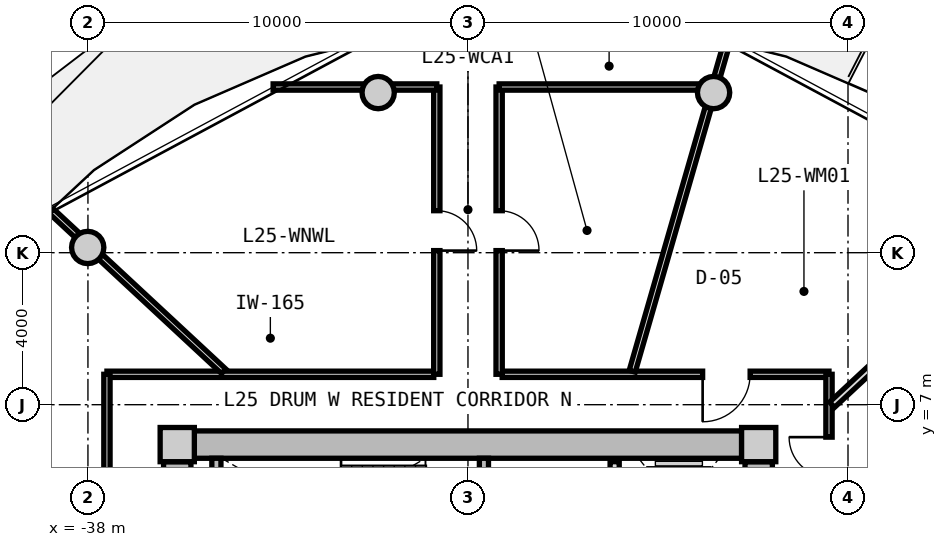
"""IFC4 building model, lengths in metres.
Left out: names, types, materials, properties, quantities, classifications, styles, units other than length and angle.
Written with IfcOpenShell. Run it as: python <this file> out.ifc"""

import sys

from ifc_helpers import new_model, si_unit, direction, frame, frame_2d, origin, origin_2d, place, context, subcontext, project, spatial, rectangle, circle, extrude, source, transform, mapped, element, fill, save


model = new_model("IFC4")
c1 = context("Model", 3, precision=1e-05, world=origin(), true_north=direction((0.0, 1.0)))
c2 = subcontext(c1, "Body", "Model", "MODEL_VIEW")
j1 = project(units=[si_unit("LENGTHUNIT", "METRE"), si_unit("PLANEANGLEUNIT", "RADIAN")], contexts=[c1])
p1 = place(None, origin())
s1 = spatial("IfcSite", under=j1, at=p1, CompositionType="ELEMENT")
p2 = place(p1, origin())
s2 = spatial("IfcBuilding", under=s1, at=p2, CompositionType="ELEMENT")
p3 = place(p2, frame((0.0, 0.0, 84.05)))
s3 = spatial("IfcBuildingStorey", under=s2, at=p3, CompositionType="ELEMENT", Elevation=84.05)
m1 = source(origin(), c2, "Body", "SweptSolid", [
    extrude(rectangle(XDim=0.9, YDim=0.9, at=origin_2d()), origin(), (0.0, 0.0, 1.0), 3.05),
])
for number, where, z_axis, x_axis in (
    (1, (-20.35, 5.95, 0.0), (0.0, 0.0, 1.0), (1.0, 0.0, 0.0)),
    (2, (-35.65, 5.95, 0.0), (0.0, 0.0, 1.0), (1.0, 0.0, 0.0)),
):
    element("IfcColumn", number, at=place(p3, frame(where, z_axis=z_axis, x_axis=x_axis)), inside=s3, PredefinedType="COLUMN", context=c2, shape_type="MappedRepresentation", body=[
        mapped(m1, transform((0.0, 0.0, 0.0), x_axis=(1.0, 0.0, 0.0), y_axis=(0.0, 1.0, 0.0), z_axis=(0.0, 0.0, 1.0), scale=1.0)),
    ])
m2 = source(origin(), c2, "Body", "SweptSolid", [
    extrude(rectangle(XDim=14.4, YDim=0.72, at=frame_2d((7.2, 0.0))), origin(), (0.0, 0.0, 1.0), 2.79),
])
p4 = place(p3, frame((-35.2, 5.95, 0.0), z_axis=(0.0, 0.0, 1.0), x_axis=(1.0, 0.0, 0.0)))
e3 = element("IfcWall", 3, at=p4, inside=s3, PredefinedType="SHEAR", context=c2, shape_type="MappedRepresentation", body=[
    mapped(m2, transform((0.0, 0.0, 0.0), x_axis=(1.0, 0.0, 0.0), y_axis=(0.0, 1.0, 0.0), z_axis=(0.0, 0.0, 1.0), scale=1.0)),
])
m3 = source(origin(), c2, "Body", "SweptSolid", [
    extrude(rectangle(XDim=11.0, YDim=0.72, at=frame_2d((5.5, 0.0))), origin(), (0.0, 0.0, 1.0), 2.79),
])
p5 = place(p3, frame((-35.65, -5.5, 0.0), z_axis=(0.0, 0.0, 1.0), x_axis=(0.0, 1.0, 0.0)))
e4 = element("IfcWall", 4, at=p5, inside=s3, PredefinedType="SHEAR", context=c2, shape_type="MappedRepresentation", body=[
    mapped(m3, transform((0.0, 0.0, 0.0), x_axis=(1.0, 0.0, 0.0), y_axis=(0.0, 1.0, 0.0), z_axis=(0.0, 0.0, 1.0), scale=1.0)),
])
p6 = place(p5, frame((3.8, 0.0, 0.0)))
e5 = element("IfcOpeningElement", 5, at=p6, cuts=e4, PredefinedType="OPENING", context=c2, shape_type="SweptSolid", body=[
    extrude(rectangle(XDim=1.2, YDim=2.15, at=frame_2d((0.6, 1.075))), frame((0.0, 0.37, 0.0), z_axis=(0.0, -1.0, 0.0), x_axis=(1.0, 0.0, 0.0)), (0.0, 0.0, 1.0), 0.74),
])
p7 = place(p3, frame((-20.35, 5.5, 0.0), z_axis=(0.0, 0.0, 1.0), x_axis=(0.0, -1.0, 0.0)))
e6 = element("IfcWall", 6, at=p7, inside=s3, PredefinedType="SHEAR", context=c2, shape_type="MappedRepresentation", body=[
    mapped(m3, transform((0.0, 0.0, 0.0), x_axis=(1.0, 0.0, 0.0), y_axis=(0.0, 1.0, 0.0), z_axis=(0.0, 0.0, 1.0), scale=1.0)),
])
p8 = place(p7, frame((5.65, 0.0, 0.0)))
e7 = element("IfcOpeningElement", 7, at=p8, cuts=e6, PredefinedType="OPENING", context=c2, shape_type="SweptSolid", body=[
    extrude(rectangle(XDim=1.2, YDim=2.15, at=frame_2d((0.6, 1.075))), frame((0.0, 0.37, 0.0), z_axis=(0.0, -1.0, 0.0), x_axis=(1.0, 0.0, 0.0)), (0.0, 0.0, 1.0), 0.74),
])
m4 = source(origin(), c2, "Body", "SweptSolid", [
    extrude(circle(Radius=0.425, at=origin_2d()), origin(), (0.0, 0.0, 1.0), 3.05),
])
for number, where, z_axis, x_axis in (
    (8, (-21.537, 15.213, 0.0), (0.0, 0.0, 1.0), (1.0, 0.0, 0.0)),
    (9, (-30.363, 15.213, 0.0), (0.0, 0.0, 1.0), (1.0, 0.0, 0.0)),
    (10, (-38.006, 11.137, 0.0), (0.0, 0.0, 1.0), (1.0, 0.0, 0.0)),
):
    element("IfcColumn", number, at=place(p3, frame(where, z_axis=z_axis, x_axis=x_axis)), inside=s3, PredefinedType="COLUMN", context=c2, shape_type="MappedRepresentation", body=[
        mapped(m4, transform((0.0, 0.0, 0.0), x_axis=(1.0, 0.0, 0.0), y_axis=(0.0, 1.0, 0.0), z_axis=(0.0, 0.0, 1.0), scale=1.0)),
    ])
m5 = source(origin(), c2, "Body", "SweptSolid", [
    extrude(rectangle(XDim=3.14, YDim=0.24, at=frame_2d((1.57, 0.0))), origin(), (0.0, 0.0, 1.0), 2.79),
])
p9 = place(p3, frame((-34.62, 2.45, 0.0), z_axis=(0.0, 0.0, 1.0), x_axis=(0.0, 1.0, 0.0)))
e11 = element("IfcWall", 11, at=p9, inside=s3, PredefinedType="PARTITIONING", context=c2, shape_type="MappedRepresentation", body=[
    mapped(m5, transform((0.0, 0.0, 0.0), x_axis=(1.0, 0.0, 0.0), y_axis=(0.0, 1.0, 0.0), z_axis=(0.0, 0.0, 1.0), scale=1.0)),
])
p10 = place(p3, frame((-27.58, 2.45, 0.0), z_axis=(0.0, 0.0, 1.0), x_axis=(0.0, 1.0, 0.0)))
e12 = element("IfcWall", 12, at=p10, inside=s3, PredefinedType="PARTITIONING", context=c2, shape_type="MappedRepresentation", body=[
    mapped(m5, transform((0.0, 0.0, 0.0), x_axis=(1.0, 0.0, 0.0), y_axis=(0.0, 1.0, 0.0), z_axis=(0.0, 0.0, 1.0), scale=1.0)),
])
p11 = place(p10, frame((0.55, 0.0, 0.0)))
e13 = element("IfcOpeningElement", 13, at=p11, cuts=e12, PredefinedType="OPENING", context=c2, shape_type="SweptSolid", body=[
    extrude(rectangle(XDim=1.1, YDim=2.15, at=frame_2d((0.55, 1.075))), frame((0.0, 0.13, 0.0), z_axis=(0.0, -1.0, 0.0), x_axis=(1.0, 0.0, 0.0)), (0.0, 0.0, 1.0), 0.26),
])
m6 = source(origin(), c2, "Body", "SweptSolid", [
    extrude(rectangle(XDim=5.0, YDim=0.24, at=frame_2d((2.5, 0.0))), origin(), (0.0, 0.0, 1.0), 2.775),
])
p12 = place(p3, frame((-24.14, 0.5, 0.0), z_axis=(0.0, 0.0, 1.0), x_axis=(0.0, 1.0, 0.0)))
e14 = element("IfcWall", 14, at=p12, inside=s3, PredefinedType="PARTITIONING", context=c2, shape_type="MappedRepresentation", body=[
    mapped(m6, transform((0.0, 0.0, 0.0), x_axis=(1.0, 0.0, 0.0), y_axis=(0.0, 1.0, 0.0), z_axis=(0.0, 0.0, 1.0), scale=1.0)),
])
p13 = place(p12, frame((3.05, 0.0, 0.0)))
e15 = element("IfcOpeningElement", 15, at=p13, cuts=e14, PredefinedType="OPENING", context=c2, shape_type="SweptSolid", body=[
    extrude(rectangle(XDim=1.3, YDim=2.2, at=frame_2d((0.65, 1.1))), frame((0.0, 0.13, 0.0), z_axis=(0.0, -1.0, 0.0), x_axis=(1.0, 0.0, 0.0)), (0.0, 0.0, 1.0), 0.26),
])
p14 = place(p12, frame((0.55, 0.0, 0.0)))
e16 = element("IfcOpeningElement", 16, at=p14, cuts=e14, PredefinedType="OPENING", context=c2, shape_type="SweptSolid", body=[
    extrude(rectangle(XDim=1.3, YDim=2.2, at=frame_2d((0.65, 1.1))), frame((0.0, 0.13, 0.0), z_axis=(0.0, -1.0, 0.0), x_axis=(1.0, 0.0, 0.0)), (0.0, 0.0, 1.0), 0.26),
])
m7 = source(origin(), c2, "Body", "SweptSolid", [
    extrude(rectangle(XDim=8.6, YDim=0.165, at=frame_2d((4.3, 0.0))), origin(), (0.0, 0.0, 1.0), 2.775),
])
p15 = place(p3, frame((-37.5, 7.8, 0.0), z_axis=(0.0, 0.0, 1.0), x_axis=(1.0, 0.0, 0.0)))
e17 = element("IfcWall", 17, at=p15, inside=s3, PredefinedType="PARTITIONING", context=c2, shape_type="MappedRepresentation", body=[
    mapped(m7, transform((0.0, 0.0, 0.0), x_axis=(1.0, 0.0, 0.0), y_axis=(0.0, 1.0, 0.0), z_axis=(0.0, 0.0, 1.0), scale=1.0)),
])
p16 = place(p3, frame((-27.1, 7.8, 0.0), z_axis=(0.0, 0.0, 1.0), x_axis=(1.0, 0.0, 0.0)))
e18 = element("IfcWall", 18, at=p16, inside=s3, PredefinedType="PARTITIONING", context=c2, shape_type="MappedRepresentation", body=[
    mapped(m7, transform((0.0, 0.0, 0.0), x_axis=(1.0, 0.0, 0.0), y_axis=(0.0, 1.0, 0.0), z_axis=(0.0, 0.0, 1.0), scale=1.0)),
])
p17 = place(p16, frame((5.275, 0.0, 0.0)))
e19 = element("IfcOpeningElement", 19, at=p17, cuts=e18, PredefinedType="OPENING", context=c2, shape_type="SweptSolid", body=[
    extrude(rectangle(XDim=1.25, YDim=2.2, at=frame_2d((0.625, 1.1))), frame((0.0, 0.093, 0.0), z_axis=(0.0, -1.0, 0.0), x_axis=(1.0, 0.0, 0.0)), (0.0, 0.0, 1.0), 0.185),
])
m8 = source(origin(), c2, "Body", "SweptSolid", [
    extrude(rectangle(XDim=15.6, YDim=0.165, at=frame_2d((7.8, 0.0))), origin(), (0.0, 0.0, 1.0), 2.775),
])
p18 = place(p3, frame((-37.5, -7.8, 0.0), z_axis=(0.0, 0.0, 1.0), x_axis=(0.0, 1.0, 0.0)))
e20 = element("IfcWall", 20, at=p18, inside=s3, PredefinedType="PARTITIONING", context=c2, shape_type="MappedRepresentation", body=[
    mapped(m8, transform((0.0, 0.0, 0.0), x_axis=(1.0, 0.0, 0.0), y_axis=(0.0, 1.0, 0.0), z_axis=(0.0, 0.0, 1.0), scale=1.0)),
])
p19 = place(p18, frame((7.175, 0.0, 0.0)))
e21 = element("IfcOpeningElement", 21, at=p19, cuts=e20, PredefinedType="OPENING", context=c2, shape_type="SweptSolid", body=[
    extrude(rectangle(XDim=1.25, YDim=2.2, at=frame_2d((0.625, 1.1))), frame((0.0, 0.093, 0.0), z_axis=(0.0, -1.0, 0.0), x_axis=(1.0, 0.0, 0.0)), (0.0, 0.0, 1.0), 0.185),
])
p20 = place(p3, frame((-18.5, 7.8, 0.0), z_axis=(0.0, 0.0, 1.0), x_axis=(0.0, -1.0, 0.0)))
e22 = element("IfcWall", 22, at=p20, inside=s3, PredefinedType="PARTITIONING", context=c2, shape_type="MappedRepresentation", body=[
    mapped(m8, transform((0.0, 0.0, 0.0), x_axis=(1.0, 0.0, 0.0), y_axis=(0.0, 1.0, 0.0), z_axis=(0.0, 0.0, 1.0), scale=1.0)),
])
p21 = place(p20, frame((12.002, 0.0, 0.0)))
e23 = element("IfcOpeningElement", 23, at=p21, cuts=e22, PredefinedType="OPENING", context=c2, shape_type="SweptSolid", body=[
    extrude(rectangle(XDim=1.05, YDim=2.15, at=frame_2d((0.525, 1.075))), frame((0.0, 0.093, 0.0), z_axis=(0.0, -1.0, 0.0), x_axis=(1.0, 0.0, 0.0)), (0.0, 0.0, 1.0), 0.185),
])
p22 = place(p20, frame((10.211, 0.0, 0.0)))
e24 = element("IfcOpeningElement", 24, at=p22, cuts=e22, PredefinedType="OPENING", context=c2, shape_type="SweptSolid", body=[
    extrude(rectangle(XDim=1.05, YDim=2.15, at=frame_2d((0.525, 1.075))), frame((0.0, 0.093, 0.0), z_axis=(0.0, -1.0, 0.0), x_axis=(1.0, 0.0, 0.0)), (0.0, 0.0, 1.0), 0.185),
])
p23 = place(p20, frame((7.722, 0.0, 0.0)))
e25 = element("IfcOpeningElement", 25, at=p23, cuts=e22, PredefinedType="OPENING", context=c2, shape_type="SweptSolid", body=[
    extrude(rectangle(XDim=1.05, YDim=2.15, at=frame_2d((0.525, 1.075))), frame((0.0, 0.093, 0.0), z_axis=(0.0, -1.0, 0.0), x_axis=(1.0, 0.0, 0.0)), (0.0, 0.0, 1.0), 0.185),
])
p24 = place(p20, frame((6.291, 0.0, 0.0)))
e26 = element("IfcOpeningElement", 26, at=p24, cuts=e22, PredefinedType="OPENING", context=c2, shape_type="SweptSolid", body=[
    extrude(rectangle(XDim=1.05, YDim=2.15, at=frame_2d((0.525, 1.075))), frame((0.0, 0.093, 0.0), z_axis=(0.0, -1.0, 0.0), x_axis=(1.0, 0.0, 0.0)), (0.0, 0.0, 1.0), 0.185),
])
p25 = place(p20, frame((4.296, 0.0, 0.0)))
e27 = element("IfcOpeningElement", 27, at=p25, cuts=e22, PredefinedType="OPENING", context=c2, shape_type="SweptSolid", body=[
    extrude(rectangle(XDim=1.05, YDim=2.15, at=frame_2d((0.525, 1.075))), frame((0.0, 0.093, 0.0), z_axis=(0.0, -1.0, 0.0), x_axis=(1.0, 0.0, 0.0)), (0.0, 0.0, 1.0), 0.185),
])
p26 = place(p20, frame((1.654, 0.0, 0.0)))
e28 = element("IfcOpeningElement", 28, at=p26, cuts=e22, PredefinedType="OPENING", context=c2, shape_type="SweptSolid", body=[
    extrude(rectangle(XDim=1.05, YDim=2.15, at=frame_2d((0.525, 1.075))), frame((0.0, 0.093, 0.0), z_axis=(0.0, -1.0, 0.0), x_axis=(1.0, 0.0, 0.0)), (0.0, 0.0, 1.0), 0.185),
])
m9 = source(origin(), c2, "Body", "SweptSolid", [
    extrude(rectangle(XDim=8.989, YDim=0.165, at=frame_2d((4.495, 0.0))), origin(), (0.0, 0.0, 1.0), 2.275),
])
p27 = place(p3, frame((-23.678, 7.88, 0.0), z_axis=(0.0, 0.0, 1.0), x_axis=(0.27702323008, 0.960863221274, 0.0)))
e29 = element("IfcWall", 29, at=p27, inside=s3, PredefinedType="PARTITIONING", context=c2, shape_type="MappedRepresentation", body=[
    mapped(m9, transform((0.0, 0.0, 0.0), x_axis=(1.0, 0.0, 0.0), y_axis=(0.0, 1.0, 0.0), z_axis=(0.0, 0.0, 1.0), scale=1.0)),
])
m10 = source(origin(), c2, "Body", "SweptSolid", [
    extrude(rectangle(XDim=6.187, YDim=0.165, at=frame_2d((3.093, 0.0))), origin(), (0.0, 0.0, 1.0), 2.275),
])
p28 = place(p3, frame((-34.429, 7.88, 0.0), z_axis=(0.0, 0.0, 1.0), x_axis=(-0.732501077882, 0.680765870841, 0.0)))
e30 = element("IfcWall", 30, at=p28, inside=s3, PredefinedType="PARTITIONING", context=c2, shape_type="MappedRepresentation", body=[
    mapped(m10, transform((0.0, 0.0, 0.0), x_axis=(1.0, 0.0, 0.0), y_axis=(0.0, 1.0, 0.0), z_axis=(0.0, 0.0, 1.0), scale=1.0)),
])
m11 = source(origin(), c2, "Body", "SweptSolid", [
    extrude(rectangle(XDim=7.56, YDim=0.165, at=frame_2d((3.78, 0.0))), origin(), (0.0, 0.0, 1.0), 2.775),
])
p29 = place(p3, frame((-28.82, 7.8, 0.0), z_axis=(0.0, 0.0, 1.0), x_axis=(0.0, 1.0, 0.0)))
e31 = element("IfcWall", 31, at=p29, inside=s3, PredefinedType="PARTITIONING", context=c2, shape_type="MappedRepresentation", body=[
    mapped(m11, transform((0.0, 0.0, 0.0), x_axis=(1.0, 0.0, 0.0), y_axis=(0.0, 1.0, 0.0), z_axis=(0.0, 0.0, 1.0), scale=1.0)),
])
p30 = place(p29, frame((3.255, 0.0, 0.0)))
e32 = element("IfcOpeningElement", 32, at=p30, cuts=e31, PredefinedType="OPENING", context=c2, shape_type="SweptSolid", body=[
    extrude(rectangle(XDim=1.05, YDim=2.15, at=frame_2d((0.525, 1.075))), frame((0.0, 0.093, 0.0), z_axis=(0.0, -1.0, 0.0), x_axis=(1.0, 0.0, 0.0)), (0.0, 0.0, 1.0), 0.185),
])
m12 = source(origin(), c2, "Body", "SweptSolid", [
    extrude(rectangle(XDim=4.307, YDim=0.165, at=frame_2d((2.153, 0.0))), origin(), (0.0, 0.0, 1.0), 2.275),
])
p31 = place(p3, frame((-33.127, 15.36, 0.0), z_axis=(0.0, 0.0, 1.0), x_axis=(1.0, 0.0, 0.0)))
e33 = element("IfcWall", 33, at=p31, inside=s3, PredefinedType="PARTITIONING", context=c2, shape_type="MappedRepresentation", body=[
    mapped(m12, transform((0.0, 0.0, 0.0), x_axis=(1.0, 0.0, 0.0), y_axis=(0.0, 1.0, 0.0), z_axis=(0.0, 0.0, 1.0), scale=1.0)),
])
p32 = place(p3, frame((-27.18, 7.8, 0.0), z_axis=(0.0, 0.0, 1.0), x_axis=(0.0, 1.0, 0.0)))
e34 = element("IfcWall", 34, at=p32, inside=s3, PredefinedType="PARTITIONING", context=c2, shape_type="MappedRepresentation", body=[
    mapped(m11, transform((0.0, 0.0, 0.0), x_axis=(1.0, 0.0, 0.0), y_axis=(0.0, 1.0, 0.0), z_axis=(0.0, 0.0, 1.0), scale=1.0)),
])
p33 = place(p32, frame((3.255, 0.0, 0.0)))
e35 = element("IfcOpeningElement", 35, at=p33, cuts=e34, PredefinedType="OPENING", context=c2, shape_type="SweptSolid", body=[
    extrude(rectangle(XDim=1.05, YDim=2.15, at=frame_2d((0.525, 1.075))), frame((0.0, 0.093, 0.0), z_axis=(0.0, -1.0, 0.0), x_axis=(1.0, 0.0, 0.0)), (0.0, 0.0, 1.0), 0.185),
])
m13 = source(origin(), c2, "Body", "SweptSolid", [
    extrude(rectangle(XDim=5.814, YDim=0.165, at=frame_2d((2.907, 0.0))), origin(), (0.0, 0.0, 1.0), 2.275),
])
p34 = place(p3, frame((-27.18, 15.36, 0.0), z_axis=(0.0, 0.0, 1.0), x_axis=(1.0, 0.0, 0.0)))
e36 = element("IfcWall", 36, at=p34, inside=s3, PredefinedType="PARTITIONING", context=c2, shape_type="MappedRepresentation", body=[
    mapped(m13, transform((0.0, 0.0, 0.0), x_axis=(1.0, 0.0, 0.0), y_axis=(0.0, 1.0, 0.0), z_axis=(0.0, 0.0, 1.0), scale=1.0)),
])
m14 = source(origin(), c2, "Body", "SweptSolid", [
    extrude(rectangle(XDim=7.482, YDim=0.19, at=frame_2d((3.741, 0.0))), origin(), (0.0, 0.0, 1.0), 2.275),
])
p35 = place(p3, frame((-18.42, 6.998, 0.0), z_axis=(0.0, 0.0, 1.0), x_axis=(0.732508698043, 0.680757671489, 0.0)))
e37 = element("IfcWall", 37, at=p35, inside=s3, PredefinedType="PARTITIONING", context=c2, shape_type="MappedRepresentation", body=[
    mapped(m14, transform((0.0, 0.0, 0.0), x_axis=(1.0, 0.0, 0.0), y_axis=(0.0, 1.0, 0.0), z_axis=(0.0, 0.0, 1.0), scale=1.0)),
])
m15 = source(origin(), c2, "Body", "SweptSolid", [
    extrude(rectangle(XDim=8.968, YDim=0.19, at=frame_2d((4.484, 0.0))), origin(), (0.0, 0.0, 1.0), 2.775),
])
p36 = place(p3, frame((-18.47, 4.036, 0.0), z_axis=(0.0, 0.0, 1.0), x_axis=(0.882202936563, 0.47086938605, 0.0)))
e38 = element("IfcWall", 38, at=p36, inside=s3, PredefinedType="PARTITIONING", context=c2, shape_type="MappedRepresentation", body=[
    mapped(m15, transform((0.0, 0.0, 0.0), x_axis=(1.0, 0.0, 0.0), y_axis=(0.0, 1.0, 0.0), z_axis=(0.0, 0.0, 1.0), scale=1.0)),
])
m16 = source(origin(), c2, "Body", "SweptSolid", [
    extrude(rectangle(XDim=1.05, YDim=2.15, at=frame_2d((0.525, 1.075))), frame((0.0, 0.025, 0.0), z_axis=(0.0, -1.0, 0.0), x_axis=(1.0, 0.0, 0.0)), (0.0, 0.0, 1.0), 0.05),
])
p37 = place(p30, frame((1.05, 0.0, 0.0), z_axis=(0.0, 0.0, 1.0), x_axis=(-1.0, 0.0, 0.0)))
e39 = element("IfcDoor", 39, at=p37, inside=s3, OperationType="SINGLE_SWING_RIGHT", PredefinedType="DOOR", context=c2, shape_type="MappedRepresentation", body=[
    mapped(m16, transform((0.0, 0.0, 0.0), x_axis=(1.0, 0.0, 0.0), y_axis=(0.0, 1.0, 0.0), z_axis=(0.0, 0.0, 1.0), scale=1.0)),
])
fill(e32, e39)
p38 = place(p33, frame((1.05, 0.0, 0.0), z_axis=(0.0, 0.0, 1.0), x_axis=(-1.0, 0.0, 0.0)))
e40 = element("IfcDoor", 40, at=p38, inside=s3, OperationType="SINGLE_SWING_RIGHT", PredefinedType="DOOR", context=c2, shape_type="MappedRepresentation", body=[
    mapped(m16, transform((0.0, 0.0, 0.0), x_axis=(1.0, 0.0, 0.0), y_axis=(0.0, 1.0, 0.0), z_axis=(0.0, 0.0, 1.0), scale=1.0)),
])
fill(e35, e40)
p39 = place(p26, frame((1.05, 0.0, 0.0), z_axis=(0.0, 0.0, 1.0), x_axis=(-1.0, 0.0, 0.0)))
e41 = element("IfcDoor", 41, at=p39, inside=s3, OperationType="SINGLE_SWING_RIGHT", PredefinedType="DOOR", context=c2, shape_type="MappedRepresentation", body=[
    mapped(m16, transform((0.0, 0.0, 0.0), x_axis=(1.0, 0.0, 0.0), y_axis=(0.0, 1.0, 0.0), z_axis=(0.0, 0.0, 1.0), scale=1.0)),
])
fill(e28, e41)
m17 = source(origin(), c2, "Body", "SweptSolid", [
    extrude(rectangle(XDim=1.25, YDim=2.2, at=frame_2d((0.625, 1.1))), frame((0.0, 0.025, 0.0), z_axis=(0.0, -1.0, 0.0), x_axis=(1.0, 0.0, 0.0)), (0.0, 0.0, 1.0), 0.05),
])
p40 = place(p17, frame((1.25, 0.0, 0.0), z_axis=(0.0, 0.0, 1.0), x_axis=(-1.0, 0.0, 0.0)))
e42 = element("IfcDoor", 42, at=p40, inside=s3, OperationType="SINGLE_SWING_RIGHT", PredefinedType="DOOR", context=c2, shape_type="MappedRepresentation", body=[
    mapped(m17, transform((0.0, 0.0, 0.0), x_axis=(1.0, 0.0, 0.0), y_axis=(0.0, 1.0, 0.0), z_axis=(0.0, 0.0, 1.0), scale=1.0)),
])
fill(e19, e42)
save(model, sys.argv[1])
